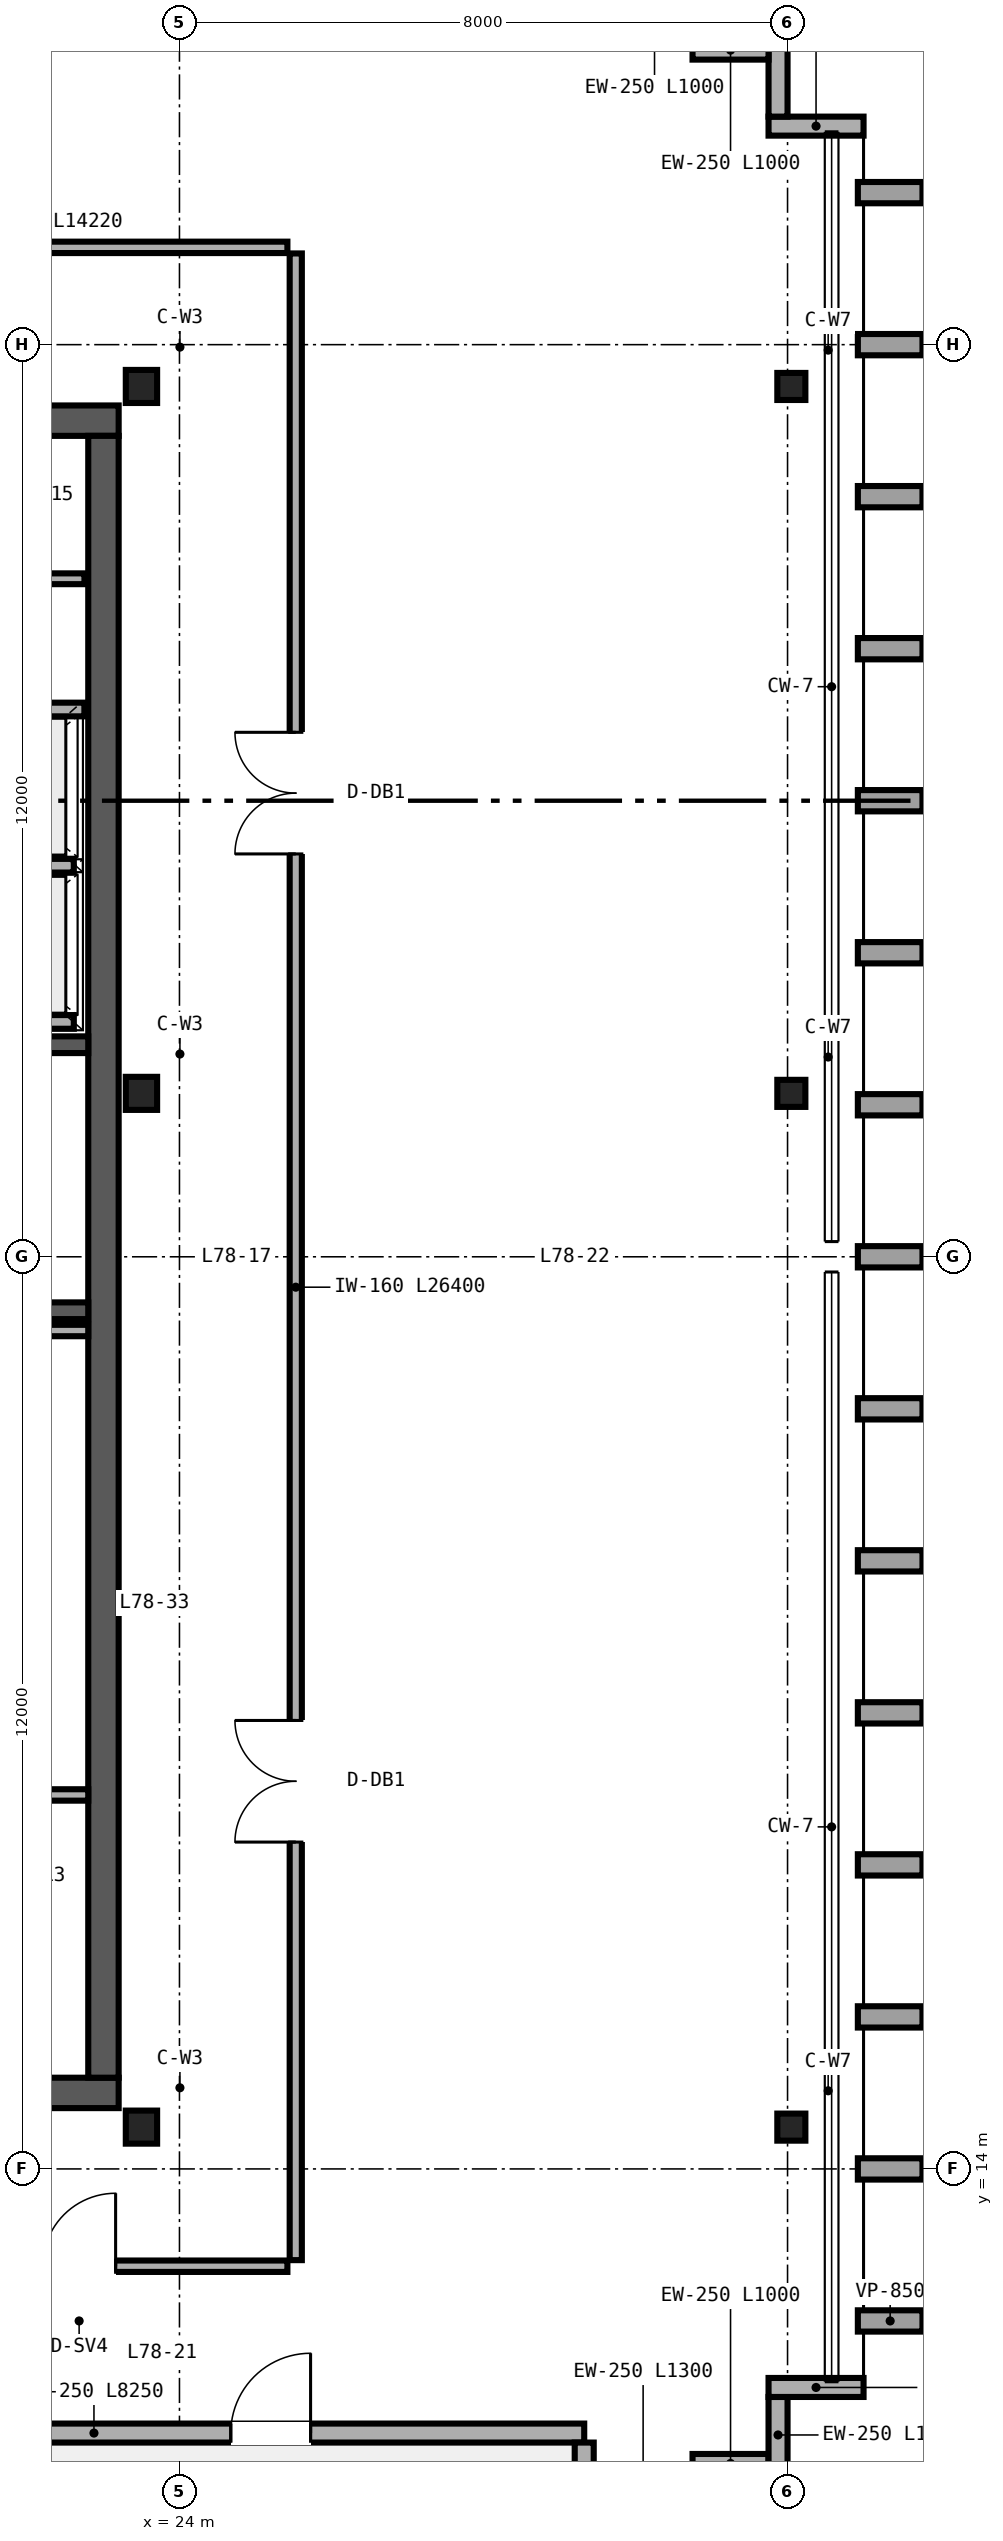
"""IFC4 building model, lengths in metres.
Left out: names, types, materials, properties, quantities, classifications, styles, units other than length and angle.
Written with IfcOpenShell. Run it as: python <this file> out.ifc"""

import sys

from ifc_helpers import new_model, si_unit, direction, frame, frame_2d, origin, origin_2d, place, context, subcontext, project, spatial, rectangle, i_section, extrude, source, transform, mapped, element, fill, save


model = new_model("IFC4")
c1 = context("Model", 3, precision=1e-05, world=origin(), true_north=direction((0.0, 1.0)))
c2 = subcontext(c1, "Body", "Model", "MODEL_VIEW")
j1 = project(units=[si_unit("LENGTHUNIT", "METRE"), si_unit("PLANEANGLEUNIT", "RADIAN")], contexts=[c1])
p1 = place(None, origin())
s1 = spatial("IfcSite", under=j1, at=p1, CompositionType="ELEMENT")
p2 = place(p1, origin())
s2 = spatial("IfcBuilding", under=s1, at=p2, CompositionType="ELEMENT")
p3 = place(p2, frame((0.0, 0.0, 305.4)))
s3 = spatial("IfcBuildingStorey", under=s2, at=p3, CompositionType="ELEMENT", Elevation=305.4)
p4 = place(p3, frame((10.8, 15.0, 0.0), z_axis=(0.0, 0.0, 1.0), x_axis=(1.0, 0.0, 0.0)))
e1 = element("IfcWall", 1, at=p4, inside=s3, PredefinedType="SHEAR", context=c2, shape_type="SweptSolid", body=[
    extrude(rectangle(XDim=12.4, YDim=0.4, at=frame_2d((6.2, 0.0))), origin(), (0.0, 0.0, 1.0), 3.88),
])
p5 = place(p4, frame((8.78, 0.0, 0.0)))
e2 = element("IfcOpeningElement", 2, at=p5, cuts=e1, PredefinedType="OPENING", context=c2, shape_type="SweptSolid", body=[
    extrude(rectangle(XDim=1.0, YDim=2.15, at=frame_2d((0.5, 1.075))), frame((0.0, 0.21, 0.0), z_axis=(0.0, -1.0, 0.0), x_axis=(1.0, 0.0, 0.0)), (0.0, 0.0, 1.0), 0.42),
])
p6 = place(p3, frame((10.8, 37.0, 0.0), z_axis=(0.0, 0.0, 1.0), x_axis=(1.0, 0.0, 0.0)))
e3 = element("IfcWall", 3, at=p6, inside=s3, PredefinedType="SHEAR", context=c2, shape_type="SweptSolid", body=[
    extrude(rectangle(XDim=12.4, YDim=0.4, at=frame_2d((6.2, 0.0))), origin(), (0.0, 0.0, 1.0), 3.88),
])
p7 = place(p6, frame((8.78, 0.0, 0.0)))
e4 = element("IfcOpeningElement", 4, at=p7, cuts=e3, PredefinedType="OPENING", context=c2, shape_type="SweptSolid", body=[
    extrude(rectangle(XDim=1.0, YDim=2.15, at=frame_2d((0.5, 1.075))), frame((0.0, 0.21, 0.0), z_axis=(0.0, -1.0, 0.0), x_axis=(1.0, 0.0, 0.0)), (0.0, 0.0, 1.0), 0.42),
])
p8 = place(p3, frame((23.0, 15.2, 0.0), z_axis=(0.0, 0.0, 1.0), x_axis=(0.0, 1.0, 0.0)))
e5 = element("IfcWall", 5, at=p8, inside=s3, PredefinedType="SHEAR", context=c2, shape_type="SweptSolid", body=[
    extrude(rectangle(XDim=21.6, YDim=0.4, at=frame_2d((10.8, 0.0))), origin(), (0.0, 0.0, 1.0), 3.88),
])
p9 = place(p3, frame((14.18, 25.29, 0.0), z_axis=(0.0, 0.0, 1.0), x_axis=(1.0, 0.0, 0.0)))
e6 = element("IfcWall", 6, at=p9, inside=s3, PredefinedType="SHEAR", context=c2, shape_type="SweptSolid", body=[
    extrude(rectangle(XDim=8.62, YDim=0.22, at=frame_2d((4.31, 0.0))), origin(), (0.0, 0.0, 1.0), 4.0),
])
p10 = place(p9, frame((0.47, 0.0, 0.0)))
e7 = element("IfcOpeningElement", 7, at=p10, cuts=e6, PredefinedType="OPENING", context=c2, shape_type="SweptSolid", body=[
    extrude(rectangle(XDim=1.05, YDim=2.15, at=frame_2d((0.525, 1.075))), frame((0.0, 0.12, 0.0), z_axis=(0.0, -1.0, 0.0), x_axis=(1.0, 0.0, 0.0)), (0.0, 0.0, 1.0), 0.24),
])
p11 = place(p3, frame((14.18, 28.79, 0.0), z_axis=(0.0, 0.0, 1.0), x_axis=(1.0, 0.0, 0.0)))
e8 = element("IfcWall", 8, at=p11, inside=s3, PredefinedType="SHEAR", context=c2, shape_type="SweptSolid", body=[
    extrude(rectangle(XDim=8.62, YDim=0.22, at=frame_2d((4.31, 0.0))), origin(), (0.0, 0.0, 1.0), 4.0),
])
m1 = source(origin(), c2, "Body", "SweptSolid", [
    extrude(i_section(OverallWidth=0.412, OverallDepth=0.435, WebThickness=0.036, FlangeThickness=0.057, FilletRadius=0.025, at=origin_2d()), origin(), (0.0, 0.0, 1.0), 3.88),
])
for number, where, z_axis, x_axis in (
    (9, (23.5, 14.55, 0.0), (0.0, 0.0, 1.0), (1.0, 0.0, 0.0)),
    (10, (23.5, 28.15, 0.0), (0.0, 0.0, 1.0), (1.0, 0.0, 0.0)),
    (11, (23.5, 37.45, 0.0), (0.0, 0.0, 1.0), (1.0, 0.0, 0.0)),
):
    element("IfcColumn", number, at=place(p3, frame(where, z_axis=z_axis, x_axis=x_axis)), inside=s3, PredefinedType="COLUMN", context=c2, shape_type="MappedRepresentation", body=[
        mapped(m1, transform((0.0, 0.0, 0.0), scale=1.0)),
    ])
m2 = source(origin(), c2, "Body", "SweptSolid", [
    extrude(i_section(OverallWidth=0.369, OverallDepth=0.356, WebThickness=0.011, FlangeThickness=0.018, FilletRadius=0.025, at=origin_2d()), origin(), (0.0, 0.0, 1.0), 3.88),
])
for number, where, z_axis, x_axis in (
    (12, (32.05, 14.55, 0.0), (0.0, 0.0, 1.0), (1.0, 0.0, 0.0)),
    (13, (32.05, 28.15, 0.0), (0.0, 0.0, 1.0), (1.0, 0.0, 0.0)),
    (14, (32.05, 37.45, 0.0), (0.0, 0.0, 1.0), (1.0, 0.0, 0.0)),
):
    element("IfcColumn", number, at=place(p3, frame(where, z_axis=z_axis, x_axis=x_axis)), inside=s3, PredefinedType="COLUMN", context=c2, shape_type="MappedRepresentation", body=[
        mapped(m2, transform((0.0, 0.0, 0.0), scale=1.0)),
    ])
for number, where, z_axis, x_axis in (
    (15, (30.75, 10.125, 0.0), (0.0, 0.0, 1.0), (1.0, 0.0, 0.0)),
    (16, (31.875, 10.0, 0.0), (0.0, 0.0, 1.0), (0.0, 1.0, 0.0)),
):
    element("IfcWall", number, at=place(p3, frame(where, z_axis=z_axis, x_axis=x_axis)), inside=s3, PredefinedType="SOLIDWALL", context=c2, shape_type="SweptSolid", body=[
        extrude(rectangle(XDim=1.0, YDim=0.25, at=frame_2d((0.5, 0.0))), origin(), (0.0, 0.0, 1.0), 3.88),
    ])
for number, where, z_axis, x_axis in (
    (17, (31.75, 11.125, 0.0), (0.0, 0.0, 1.0), (1.0, 0.0, 0.0)),
    (18, (33.0, 40.875, 0.0), (0.0, 0.0, 1.0), (-1.0, 0.0, 0.0)),
):
    element("IfcWall", number, at=place(p3, frame(where, z_axis=z_axis, x_axis=x_axis)), inside=s3, PredefinedType="SOLIDWALL", context=c2, shape_type="SweptSolid", body=[
        extrude(rectangle(XDim=1.25, YDim=0.25, at=frame_2d((0.625, 0.0))), origin(), (0.0, 0.0, 1.0), 3.88),
    ])
for number, where, z_axis, x_axis in (
    (19, (31.875, 41.0, 0.0), (0.0, 0.0, 1.0), (0.0, 1.0, 0.0)),
    (20, (31.75, 41.875, 0.0), (0.0, 0.0, 1.0), (-1.0, 0.0, 0.0)),
):
    element("IfcWall", number, at=place(p3, frame(where, z_axis=z_axis, x_axis=x_axis)), inside=s3, PredefinedType="SOLIDWALL", context=c2, shape_type="SweptSolid", body=[
        extrude(rectangle(XDim=1.0, YDim=0.25, at=frame_2d((0.5, 0.0))), origin(), (0.0, 0.0, 1.0), 3.88),
    ])
p12 = place(p3, frame((21.075, 10.525, 0.0), z_axis=(0.0, 0.0, 1.0), x_axis=(1.0, 0.0, 0.0)))
e21 = element("IfcWall", 21, at=p12, inside=s3, PredefinedType="SOLIDWALL", context=c2, shape_type="SweptSolid", body=[
    extrude(rectangle(XDim=8.25, YDim=0.25, at=frame_2d((4.125, 0.0))), origin(), (0.0, 0.0, 1.0), 3.88),
])
p13 = place(p12, frame((3.6, 0.0, 0.0)))
e22 = element("IfcOpeningElement", 22, at=p13, cuts=e21, PredefinedType="OPENING", context=c2, shape_type="SweptSolid", body=[
    extrude(rectangle(XDim=1.05, YDim=2.15, at=frame_2d((0.525, 1.075))), frame((0.0, 0.135, 0.0), z_axis=(0.0, -1.0, 0.0), x_axis=(1.0, 0.0, 0.0)), (0.0, 0.0, 1.0), 0.27),
])
p14 = place(p3, frame((29.325, 8.1, 0.0), z_axis=(0.0, 0.0, 1.0), x_axis=(0.0, 1.0, 0.0)))
e23 = element("IfcWall", 23, at=p14, inside=s3, PredefinedType="SOLIDWALL", context=c2, shape_type="SweptSolid", body=[
    extrude(rectangle(XDim=2.3, YDim=0.25, at=frame_2d((1.15, 0.0))), origin(), (0.0, 0.0, 1.0), 3.88),
])
p15 = place(p3, frame((20.25, 29.09, 0.0), z_axis=(0.0, 0.0, 1.0), x_axis=(1.0, 0.0, 0.0)))
e24 = element("IfcWall", 24, at=p15, inside=s3, PredefinedType="SOLIDWALL", context=c2, shape_type="SweptSolid", body=[
    extrude(rectangle(XDim=2.36, YDim=0.18, at=frame_2d((1.18, 0.0))), origin(), (0.0, 0.0, 1.0), 3.88),
])
p16 = place(p3, frame((20.25, 33.2, 0.0), z_axis=(0.0, 0.0, 1.0), x_axis=(1.0, 0.0, 0.0)))
e25 = element("IfcWall", 25, at=p16, inside=s3, PredefinedType="SOLIDWALL", context=c2, shape_type="SweptSolid", body=[
    extrude(rectangle(XDim=2.5, YDim=0.18, at=frame_2d((1.25, 0.0))), origin(), (0.0, 0.0, 1.0), 3.88),
])
p17 = place(p3, frame((20.25, 31.145, 0.0), z_axis=(0.0, 0.0, 1.0), x_axis=(1.0, 0.0, 0.0)))
e26 = element("IfcWall", 26, at=p17, inside=s3, PredefinedType="SOLIDWALL", context=c2, shape_type="SweptSolid", body=[
    extrude(rectangle(XDim=2.36, YDim=0.18, at=frame_2d((1.18, 0.0))), origin(), (0.0, 0.0, 1.0), 3.88),
])
p18 = place(p3, frame((20.74, 34.92, 0.0), z_axis=(0.0, 0.0, 1.0), x_axis=(1.0, 0.0, 0.0)))
e27 = element("IfcWall", 27, at=p18, inside=s3, PredefinedType="PARTITIONING", context=c2, shape_type="SweptSolid", body=[
    extrude(rectangle(XDim=2.01, YDim=0.142, at=frame_2d((1.005, 0.0))), origin(), (0.0, 0.0, 1.0), 3.88),
])
p19 = place(p18, frame((0.5, 0.0, 0.0)))
e28 = element("IfcOpeningElement", 28, at=p19, cuts=e27, PredefinedType="OPENING", context=c2, shape_type="SweptSolid", body=[
    extrude(rectangle(XDim=0.84, YDim=2.1, at=frame_2d((0.42, 1.05))), frame((0.0, 0.081, 0.0), z_axis=(0.0, -1.0, 0.0), x_axis=(1.0, 0.0, 0.0)), (0.0, 0.0, 1.0), 0.162),
])
for number, where, z_axis, x_axis in (
    (29, (20.07, 18.92, 0.0), (0.0, 0.0, 1.0), (1.0, 0.0, 0.0)),
    (30, (20.07, 25.03, 0.0), (0.0, 0.0, 1.0), (1.0, 0.0, 0.0)),
):
    element("IfcWall", number, at=place(p3, frame(where, z_axis=z_axis, x_axis=x_axis)), inside=s3, PredefinedType="PARTITIONING", context=c2, shape_type="SweptSolid", body=[
        extrude(rectangle(XDim=2.73, YDim=0.15, at=frame_2d((1.365, 0.0))), origin(), (0.0, 0.0, 1.0), 3.88),
    ])
p20 = place(p3, frame((11.2, 12.72, 0.0), z_axis=(0.0, 0.0, 1.0), x_axis=(1.0, 0.0, 0.0)))
e31 = element("IfcWall", 31, at=p20, inside=s3, PredefinedType="PARTITIONING", context=c2, shape_type="SweptSolid", body=[
    extrude(rectangle(XDim=14.22, YDim=0.15, at=frame_2d((7.11, 0.0))), origin(), (0.0, 0.0, 1.0), 3.88),
])
p21 = place(p20, frame((3.8, 0.0, 0.0)))
e32 = element("IfcOpeningElement", 32, at=p21, cuts=e31, PredefinedType="OPENING", context=c2, shape_type="SweptSolid", body=[
    extrude(rectangle(XDim=1.0, YDim=2.15, at=frame_2d((0.5, 1.075))), frame((0.0, 0.085, 0.0), z_axis=(0.0, -1.0, 0.0), x_axis=(1.0, 0.0, 0.0)), (0.0, 0.0, 1.0), 0.17),
])
p22 = place(p20, frame((11.0, 0.0, 0.0)))
e33 = element("IfcOpeningElement", 33, at=p22, cuts=e31, PredefinedType="OPENING", context=c2, shape_type="SweptSolid", body=[
    extrude(rectangle(XDim=0.96, YDim=2.15, at=frame_2d((0.48, 1.075))), frame((0.0, 0.085, 0.0), z_axis=(0.0, -1.0, 0.0), x_axis=(1.0, 0.0, 0.0)), (0.0, 0.0, 1.0), 0.17),
])
p23 = place(p3, frame((25.53, 12.8, 0.0), z_axis=(0.0, 0.0, 1.0), x_axis=(0.0, 1.0, 0.0)))
e34 = element("IfcWall", 34, at=p23, inside=s3, PredefinedType="PARTITIONING", context=c2, shape_type="SweptSolid", body=[
    extrude(rectangle(XDim=26.4, YDim=0.16, at=frame_2d((13.2, 0.0))), origin(), (0.0, 0.0, 1.0), 3.024),
])
p24 = place(p23, frame((5.5, 0.0, 0.0)))
e35 = element("IfcOpeningElement", 35, at=p24, cuts=e34, PredefinedType="OPENING", context=c2, shape_type="SweptSolid", body=[
    extrude(rectangle(XDim=1.6, YDim=2.3, at=frame_2d((0.8, 1.15))), frame((0.0, 0.09, 0.0), z_axis=(0.0, -1.0, 0.0), x_axis=(1.0, 0.0, 0.0)), (0.0, 0.0, 1.0), 0.18),
])
p25 = place(p23, frame((18.5, 0.0, 0.0)))
e36 = element("IfcOpeningElement", 36, at=p25, cuts=e34, PredefinedType="OPENING", context=c2, shape_type="SweptSolid", body=[
    extrude(rectangle(XDim=1.6, YDim=2.3, at=frame_2d((0.8, 1.15))), frame((0.0, 0.09, 0.0), z_axis=(0.0, -1.0, 0.0), x_axis=(1.0, 0.0, 0.0)), (0.0, 0.0, 1.0), 0.18),
])
p26 = place(p3, frame((11.2, 39.28, 0.0), z_axis=(0.0, 0.0, 1.0), x_axis=(1.0, 0.0, 0.0)))
e37 = element("IfcWall", 37, at=p26, inside=s3, PredefinedType="PARTITIONING", context=c2, shape_type="SweptSolid", body=[
    extrude(rectangle(XDim=14.22, YDim=0.15, at=frame_2d((7.11, 0.0))), origin(), (0.0, 0.0, 1.0), 3.88),
])
p27 = place(p26, frame((0.8, 0.0, 0.0)))
e38 = element("IfcOpeningElement", 38, at=p27, cuts=e37, PredefinedType="OPENING", context=c2, shape_type="SweptSolid", body=[
    extrude(rectangle(XDim=0.84, YDim=2.1, at=frame_2d((0.42, 1.05))), frame((0.0, 0.085, 0.0), z_axis=(0.0, -1.0, 0.0), x_axis=(1.0, 0.0, 0.0)), (0.0, 0.0, 1.0), 0.17),
])
p28 = place(p26, frame((3.1, 0.0, 0.0)))
e39 = element("IfcOpeningElement", 39, at=p28, cuts=e37, PredefinedType="OPENING", context=c2, shape_type="SweptSolid", body=[
    extrude(rectangle(XDim=0.84, YDim=2.1, at=frame_2d((0.42, 1.05))), frame((0.0, 0.085, 0.0), z_axis=(0.0, -1.0, 0.0), x_axis=(1.0, 0.0, 0.0)), (0.0, 0.0, 1.0), 0.17),
])
p29 = place(p26, frame((6.8, 0.0, 0.0)))
e40 = element("IfcOpeningElement", 40, at=p29, cuts=e37, PredefinedType="OPENING", context=c2, shape_type="SweptSolid", body=[
    extrude(rectangle(XDim=1.1, YDim=2.15, at=frame_2d((0.55, 1.075))), frame((0.0, 0.085, 0.0), z_axis=(0.0, -1.0, 0.0), x_axis=(1.0, 0.0, 0.0)), (0.0, 0.0, 1.0), 0.17),
])
m3 = source(origin(), c2, "Body", "SweptSolid", [
    extrude(rectangle(XDim=1.05, YDim=2.15, at=frame_2d((0.525, 1.075))), frame((0.0, 0.025, 0.0), z_axis=(0.0, -1.0, 0.0), x_axis=(1.0, 0.0, 0.0)), (0.0, 0.0, 1.0), 0.05),
])
p30 = place(p13, origin())
e41 = element("IfcDoor", 41, at=p30, inside=s3, OperationType="SINGLE_SWING_RIGHT", PredefinedType="DOOR", context=c2, shape_type="MappedRepresentation", body=[
    mapped(m3, transform((0.0, 0.0, 0.0), scale=1.0)),
])
fill(e22, e41)
m4 = source(origin(), c2, "Body", "SweptSolid", [
    extrude(rectangle(XDim=0.96, YDim=2.15, at=frame_2d((0.48, 1.075))), frame((0.0, 0.025, 0.0), z_axis=(0.0, -1.0, 0.0), x_axis=(1.0, 0.0, 0.0)), (0.0, 0.0, 1.0), 0.05),
])
p31 = place(p22, origin())
e42 = element("IfcDoor", 42, at=p31, inside=s3, OperationType="SINGLE_SWING_RIGHT", PredefinedType="DOOR", context=c2, shape_type="MappedRepresentation", body=[
    mapped(m4, transform((0.0, 0.0, 0.0), scale=1.0)),
])
fill(e33, e42)
m5 = source(origin(), c2, "Body", "SweptSolid", [
    extrude(rectangle(XDim=1.6, YDim=2.3, at=frame_2d((0.8, 1.15))), frame((0.0, 0.025, 0.0), z_axis=(0.0, -1.0, 0.0), x_axis=(1.0, 0.0, 0.0)), (0.0, 0.0, 1.0), 0.05),
])
p32 = place(p24, origin())
e43 = element("IfcDoor", 43, at=p32, inside=s3, OperationType="DOUBLE_DOOR_SINGLE_SWING", PredefinedType="DOOR", context=c2, shape_type="MappedRepresentation", body=[
    mapped(m5, transform((0.0, 0.0, 0.0), scale=1.0)),
])
fill(e35, e43)
p33 = place(p25, origin())
e44 = element("IfcDoor", 44, at=p33, inside=s3, OperationType="DOUBLE_DOOR_SINGLE_SWING", PredefinedType="DOOR", context=c2, shape_type="MappedRepresentation", body=[
    mapped(m5, transform((0.0, 0.0, 0.0), scale=1.0)),
])
fill(e36, e44)
save(model, sys.argv[1])
